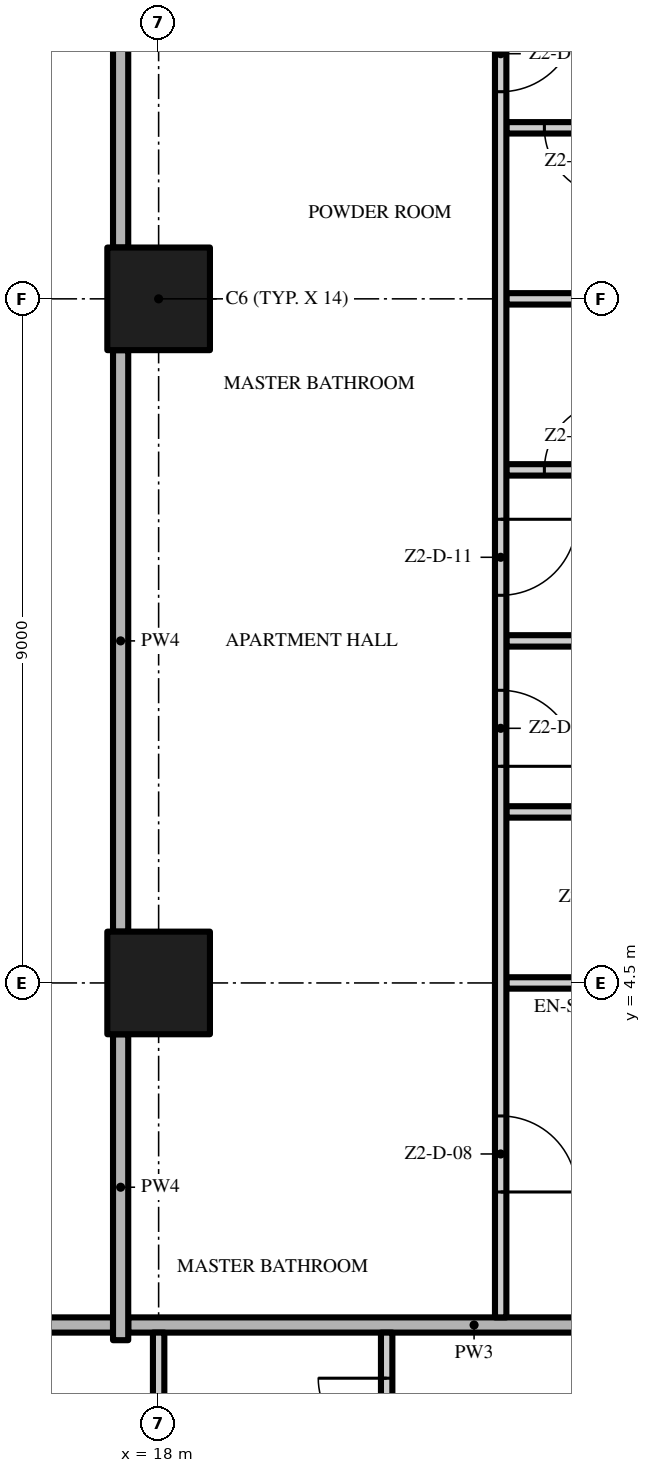
"""IFC4 building model, lengths in metres.
Left out: names, types, materials, properties, quantities, classifications, styles, units other than length and angle.
Written with IfcOpenShell. Run it as: python <this file> out.ifc"""

import sys

from ifc_helpers import new_model, si_unit, direction, frame, frame_2d, origin, origin_2d, place, context, subcontext, project, spatial, rectangle, extrude, element, fill, save


model = new_model("IFC4")
c1 = context("Model", 3, precision=1e-05, world=origin(), true_north=direction((0.0, 1.0)))
c2 = subcontext(c1, "Body", "Model", "MODEL_VIEW")
j1 = project(units=[si_unit("LENGTHUNIT", "METRE"), si_unit("PLANEANGLEUNIT", "RADIAN")], contexts=[c1])
p1 = place(None, origin())
s1 = spatial("IfcSite", under=j1, at=p1, CompositionType="ELEMENT")
p2 = place(p1, origin())
s2 = spatial("IfcBuilding", under=s1, at=p2, CompositionType="ELEMENT")
p3 = place(p2, frame((0.0, 0.0, 111.2)))
s3 = spatial("IfcBuildingStorey", under=s2, at=p3, CompositionType="ELEMENT", Elevation=111.2)
for number, where, z_axis, x_axis in (
    (1, (18.0, 13.5, 0.0), (0.0, 0.0, 1.0), (1.0, 0.0, 0.0)),
    (2, (18.0, 4.5, 0.0), (0.0, 0.0, 1.0), (1.0, 0.0, 0.0)),
):
    element("IfcColumn", number, at=place(p3, frame(where, z_axis=z_axis, x_axis=x_axis)), inside=s3, PredefinedType="COLUMN", context=c2, shape_type="SweptSolid", body=[
        extrude(rectangle(XDim=1.35, YDim=1.35, at=origin_2d()), origin(), (0.0, 0.0, 1.0), 3.5),
    ])
p4 = place(p3, frame((4.6, 0.0, 0.0), z_axis=(0.0, 0.0, 1.0), x_axis=(1.0, 0.0, 0.0)))
e3 = element("IfcWall", 3, at=p4, inside=s3, PredefinedType="PARTITIONING", context=c2, shape_type="SweptSolid", body=[
    extrude(rectangle(XDim=12.8, YDim=0.2, at=frame_2d((6.4, 0.0))), origin(), (0.0, 0.0, 1.0), 3.5),
])
p5 = place(p3, frame((17.6, 0.0, 0.0), z_axis=(0.0, 0.0, 1.0), x_axis=(1.0, 0.0, 0.0)))
e4 = element("IfcWall", 4, at=p5, inside=s3, PredefinedType="PARTITIONING", context=c2, shape_type="SweptSolid", body=[
    extrude(rectangle(XDim=9.1, YDim=0.2, at=frame_2d((4.55, 0.0))), origin(), (0.0, 0.0, 1.0), 3.5),
])
p6 = place(p3, frame((22.575, 4.5, 0.0), z_axis=(0.0, 0.0, 1.0), x_axis=(1.0, 0.0, 0.0)))
e5 = element("IfcWall", 5, at=p6, inside=s3, PredefinedType="PARTITIONING", context=c2, shape_type="SweptSolid", body=[
    extrude(rectangle(XDim=3.175, YDim=0.15, at=frame_2d((1.587, 0.0))), origin(), (0.0, 0.0, 1.0), 3.5),
])
p7 = place(p3, frame((22.575, 6.75, 0.0), z_axis=(0.0, 0.0, 1.0), x_axis=(1.0, 0.0, 0.0)))
e6 = element("IfcWall", 6, at=p7, inside=s3, PredefinedType="PARTITIONING", context=c2, shape_type="SweptSolid", body=[
    extrude(rectangle(XDim=1.875, YDim=0.15, at=frame_2d((0.938, 0.0))), origin(), (0.0, 0.0, 1.0), 3.5),
])
p8 = place(p3, frame((22.575, 9.0, 0.0), z_axis=(0.0, 0.0, 1.0), x_axis=(1.0, 0.0, 0.0)))
e7 = element("IfcWall", 7, at=p8, inside=s3, PredefinedType="PARTITIONING", context=c2, shape_type="SweptSolid", body=[
    extrude(rectangle(XDim=4.125, YDim=0.15, at=frame_2d((2.062, 0.0))), origin(), (0.0, 0.0, 1.0), 3.5),
])
p9 = place(p3, frame((22.575, 11.25, 0.0), z_axis=(0.0, 0.0, 1.0), x_axis=(1.0, 0.0, 0.0)))
e8 = element("IfcWall", 8, at=p9, inside=s3, PredefinedType="PARTITIONING", context=c2, shape_type="SweptSolid", body=[
    extrude(rectangle(XDim=1.875, YDim=0.15, at=frame_2d((0.938, 0.0))), origin(), (0.0, 0.0, 1.0), 3.5),
])
p10 = place(p9, frame((0.5, 0.0, 0.0)))
e9 = element("IfcOpeningElement", 9, at=p10, cuts=e8, PredefinedType="OPENING", context=c2, shape_type="SweptSolid", body=[
    extrude(rectangle(XDim=0.9, YDim=2.1, at=frame_2d((0.45, 1.05))), frame((0.0, 0.085, 0.0), z_axis=(0.0, -1.0, 0.0), x_axis=(1.0, 0.0, 0.0)), (0.0, 0.0, 1.0), 0.17),
])
p11 = place(p3, frame((22.575, 13.5, 0.0), z_axis=(0.0, 0.0, 1.0), x_axis=(1.0, 0.0, 0.0)))
e10 = element("IfcWall", 10, at=p11, inside=s3, PredefinedType="PARTITIONING", context=c2, shape_type="SweptSolid", body=[
    extrude(rectangle(XDim=1.875, YDim=0.15, at=frame_2d((0.938, 0.0))), origin(), (0.0, 0.0, 1.0), 3.5),
])
p12 = place(p3, frame((24.45, 15.75, 0.0), z_axis=(0.0, 0.0, 1.0), x_axis=(-1.0, 0.0, 0.0)))
e11 = element("IfcWall", 11, at=p12, inside=s3, PredefinedType="PARTITIONING", context=c2, shape_type="SweptSolid", body=[
    extrude(rectangle(XDim=1.875, YDim=0.15, at=frame_2d((0.938, 0.0))), origin(), (0.0, 0.0, 1.0), 3.5),
])
p13 = place(p12, frame((0.475, 0.0, 0.0)))
e12 = element("IfcOpeningElement", 12, at=p13, cuts=e11, PredefinedType="OPENING", context=c2, shape_type="SweptSolid", body=[
    extrude(rectangle(XDim=0.9, YDim=2.1, at=frame_2d((0.45, 1.05))), frame((0.0, 0.085, 0.0), z_axis=(0.0, -1.0, 0.0), x_axis=(1.0, 0.0, 0.0)), (0.0, 0.0, 1.0), 0.17),
])
p14 = place(p3, frame((17.5, -0.2, 0.0), z_axis=(0.0, 0.0, 1.0), x_axis=(0.0, 1.0, 0.0)))
e13 = element("IfcWall", 13, at=p14, inside=s3, PredefinedType="PARTITIONING", context=c2, shape_type="SweptSolid", body=[
    extrude(rectangle(XDim=4.025, YDim=0.2, at=frame_2d((2.013, 0.0))), origin(), (0.0, 0.0, 1.0), 3.5),
])
p15 = place(p3, frame((17.5, 5.175, 0.0), z_axis=(0.0, 0.0, 1.0), x_axis=(0.0, 1.0, 0.0)))
e14 = element("IfcWall", 14, at=p15, inside=s3, PredefinedType="PARTITIONING", context=c2, shape_type="SweptSolid", body=[
    extrude(rectangle(XDim=7.65, YDim=0.2, at=frame_2d((3.825, 0.0))), origin(), (0.0, 0.0, 1.0), 3.5),
])
p16 = place(p3, frame((17.5, 21.25, 0.0), z_axis=(0.0, 0.0, 1.0), x_axis=(0.0, -1.0, 0.0)))
e15 = element("IfcWall", 15, at=p16, inside=s3, PredefinedType="PARTITIONING", context=c2, shape_type="SweptSolid", body=[
    extrude(rectangle(XDim=7.075, YDim=0.2, at=frame_2d((3.538, 0.0))), origin(), (0.0, 0.0, 1.0), 3.5),
])
p17 = place(p16, frame((2.65, 0.0, 0.0)))
e16 = element("IfcOpeningElement", 16, at=p17, cuts=e15, PredefinedType="OPENING", context=c2, shape_type="SweptSolid", body=[
    extrude(rectangle(XDim=1.2, YDim=2.4, at=frame_2d((0.6, 1.2))), frame((0.0, 0.11, 0.0), z_axis=(0.0, -1.0, 0.0), x_axis=(1.0, 0.0, 0.0)), (0.0, 0.0, 1.0), 0.22),
])
p18 = place(p3, frame((18.0, -0.1, 0.0), z_axis=(0.0, 0.0, 1.0), x_axis=(0.0, -1.0, 0.0)))
e17 = element("IfcWall", 17, at=p18, inside=s3, PredefinedType="PARTITIONING", context=c2, shape_type="SweptSolid", body=[
    extrude(rectangle(XDim=3.725, YDim=0.15, at=frame_2d((1.863, 0.0))), origin(), (0.0, 0.0, 1.0), 3.5),
])
p19 = place(p18, frame((2.575, 0.0, 0.0)))
e18 = element("IfcOpeningElement", 18, at=p19, cuts=e17, PredefinedType="OPENING", context=c2, shape_type="SweptSolid", body=[
    extrude(rectangle(XDim=1.0, YDim=2.4, at=frame_2d((0.5, 1.2))), frame((0.0, 0.085, 0.0), z_axis=(0.0, -1.0, 0.0), x_axis=(1.0, 0.0, 0.0)), (0.0, 0.0, 1.0), 0.17),
])
p20 = place(p3, frame((21.0, -2.325, 0.0), z_axis=(0.0, 0.0, 1.0), x_axis=(0.0, 1.0, 0.0)))
e19 = element("IfcWall", 19, at=p20, inside=s3, PredefinedType="PARTITIONING", context=c2, shape_type="SweptSolid", body=[
    extrude(rectangle(XDim=2.225, YDim=0.15, at=frame_2d((1.113, 0.0))), origin(), (0.0, 0.0, 1.0), 3.5),
])
p21 = place(p20, frame((0.725, 0.0, 0.0)))
e20 = element("IfcOpeningElement", 20, at=p21, cuts=e19, PredefinedType="OPENING", context=c2, shape_type="SweptSolid", body=[
    extrude(rectangle(XDim=0.9, YDim=2.1, at=frame_2d((0.45, 1.05))), frame((0.0, 0.085, 0.0), z_axis=(0.0, -1.0, 0.0), x_axis=(1.0, 0.0, 0.0)), (0.0, 0.0, 1.0), 0.17),
])
p22 = place(p3, frame((22.5, 17.375, 0.0), z_axis=(0.0, 0.0, 1.0), x_axis=(0.0, -1.0, 0.0)))
e21 = element("IfcWall", 21, at=p22, inside=s3, PredefinedType="PARTITIONING", context=c2, shape_type="SweptSolid", body=[
    extrude(rectangle(XDim=17.275, YDim=0.15, at=frame_2d((8.637, 0.0))), origin(), (0.0, 0.0, 1.0), 3.5),
])
p23 = place(p22, frame((14.625, 0.0, 0.0)))
e22 = element("IfcOpeningElement", 22, at=p23, cuts=e21, PredefinedType="OPENING", context=c2, shape_type="SweptSolid", body=[
    extrude(rectangle(XDim=1.0, YDim=2.4, at=frame_2d((0.5, 1.2))), frame((0.0, 0.085, 0.0), z_axis=(0.0, -1.0, 0.0), x_axis=(1.0, 0.0, 0.0)), (0.0, 0.0, 1.0), 0.17),
])
p24 = place(p22, frame((9.025, 0.0, 0.0)))
e23 = element("IfcOpeningElement", 23, at=p24, cuts=e21, PredefinedType="OPENING", context=c2, shape_type="SweptSolid", body=[
    extrude(rectangle(XDim=1.0, YDim=2.4, at=frame_2d((0.5, 1.2))), frame((0.0, 0.085, 0.0), z_axis=(0.0, -1.0, 0.0), x_axis=(1.0, 0.0, 0.0)), (0.0, 0.0, 1.0), 0.17),
])
p25 = place(p22, frame((6.775, 0.0, 0.0)))
e24 = element("IfcOpeningElement", 24, at=p25, cuts=e21, PredefinedType="OPENING", context=c2, shape_type="SweptSolid", body=[
    extrude(rectangle(XDim=1.0, YDim=2.4, at=frame_2d((0.5, 1.2))), frame((0.0, 0.085, 0.0), z_axis=(0.0, -1.0, 0.0), x_axis=(1.0, 0.0, 0.0)), (0.0, 0.0, 1.0), 0.17),
])
p26 = place(p22, frame((0.15, 0.0, 0.0)))
e25 = element("IfcOpeningElement", 25, at=p26, cuts=e21, PredefinedType="OPENING", context=c2, shape_type="SweptSolid", body=[
    extrude(rectangle(XDim=1.0, YDim=2.4, at=frame_2d((0.5, 1.2))), frame((0.0, 0.085, 0.0), z_axis=(0.0, -1.0, 0.0), x_axis=(1.0, 0.0, 0.0)), (0.0, 0.0, 1.0), 0.17),
])
p27 = place(p23, origin())
e26 = element("IfcDoor", 26, at=p27, inside=s3, OperationType="SINGLE_SWING_RIGHT", PredefinedType="DOOR", context=c2, shape_type="SweptSolid", body=[
    extrude(rectangle(XDim=1.0, YDim=2.4, at=frame_2d((0.5, 1.2))), frame((0.0, 0.025, 0.0), z_axis=(0.0, -1.0, 0.0), x_axis=(1.0, 0.0, 0.0)), (0.0, 0.0, 1.0), 0.05),
])
fill(e22, e26)
p28 = place(p24, origin())
e27 = element("IfcDoor", 27, at=p28, inside=s3, OperationType="SINGLE_SWING_RIGHT", PredefinedType="DOOR", context=c2, shape_type="SweptSolid", body=[
    extrude(rectangle(XDim=1.0, YDim=2.4, at=frame_2d((0.5, 1.2))), frame((0.0, 0.025, 0.0), z_axis=(0.0, -1.0, 0.0), x_axis=(1.0, 0.0, 0.0)), (0.0, 0.0, 1.0), 0.05),
])
fill(e23, e27)
p29 = place(p25, origin())
e28 = element("IfcDoor", 28, at=p29, inside=s3, OperationType="SINGLE_SWING_LEFT", PredefinedType="DOOR", context=c2, shape_type="SweptSolid", body=[
    extrude(rectangle(XDim=1.0, YDim=2.4, at=frame_2d((0.5, 1.2))), frame((0.0, 0.025, 0.0), z_axis=(0.0, -1.0, 0.0), x_axis=(1.0, 0.0, 0.0)), (0.0, 0.0, 1.0), 0.05),
])
fill(e24, e28)
p30 = place(p10, origin())
e29 = element("IfcDoor", 29, at=p30, inside=s3, OperationType="SINGLE_SWING_RIGHT", PredefinedType="DOOR", context=c2, shape_type="SweptSolid", body=[
    extrude(rectangle(XDim=0.9, YDim=2.1, at=frame_2d((0.45, 1.05))), frame((0.0, 0.025, 0.0), z_axis=(0.0, -1.0, 0.0), x_axis=(1.0, 0.0, 0.0)), (0.0, 0.0, 1.0), 0.05),
])
fill(e9, e29)
p31 = place(p26, origin())
e30 = element("IfcDoor", 30, at=p31, inside=s3, OperationType="SINGLE_SWING_LEFT", PredefinedType="DOOR", context=c2, shape_type="SweptSolid", body=[
    extrude(rectangle(XDim=1.0, YDim=2.4, at=frame_2d((0.5, 1.2))), frame((0.0, 0.025, 0.0), z_axis=(0.0, -1.0, 0.0), x_axis=(1.0, 0.0, 0.0)), (0.0, 0.0, 1.0), 0.05),
])
fill(e25, e30)
p32 = place(p13, origin())
e31 = element("IfcDoor", 31, at=p32, inside=s3, OperationType="SINGLE_SWING_LEFT", PredefinedType="DOOR", context=c2, shape_type="SweptSolid", body=[
    extrude(rectangle(XDim=0.9, YDim=2.1, at=frame_2d((0.45, 1.05))), frame((0.0, 0.025, 0.0), z_axis=(0.0, -1.0, 0.0), x_axis=(1.0, 0.0, 0.0)), (0.0, 0.0, 1.0), 0.05),
])
fill(e12, e31)
p33 = place(p21, origin())
e32 = element("IfcDoor", 32, at=p33, inside=s3, OperationType="SINGLE_SWING_RIGHT", PredefinedType="DOOR", context=c2, shape_type="SweptSolid", body=[
    extrude(rectangle(XDim=0.9, YDim=2.1, at=frame_2d((0.45, 1.05))), frame((0.0, 0.025, 0.0), z_axis=(0.0, -1.0, 0.0), x_axis=(1.0, 0.0, 0.0)), (0.0, 0.0, 1.0), 0.05),
])
fill(e20, e32)
save(model, sys.argv[1])
